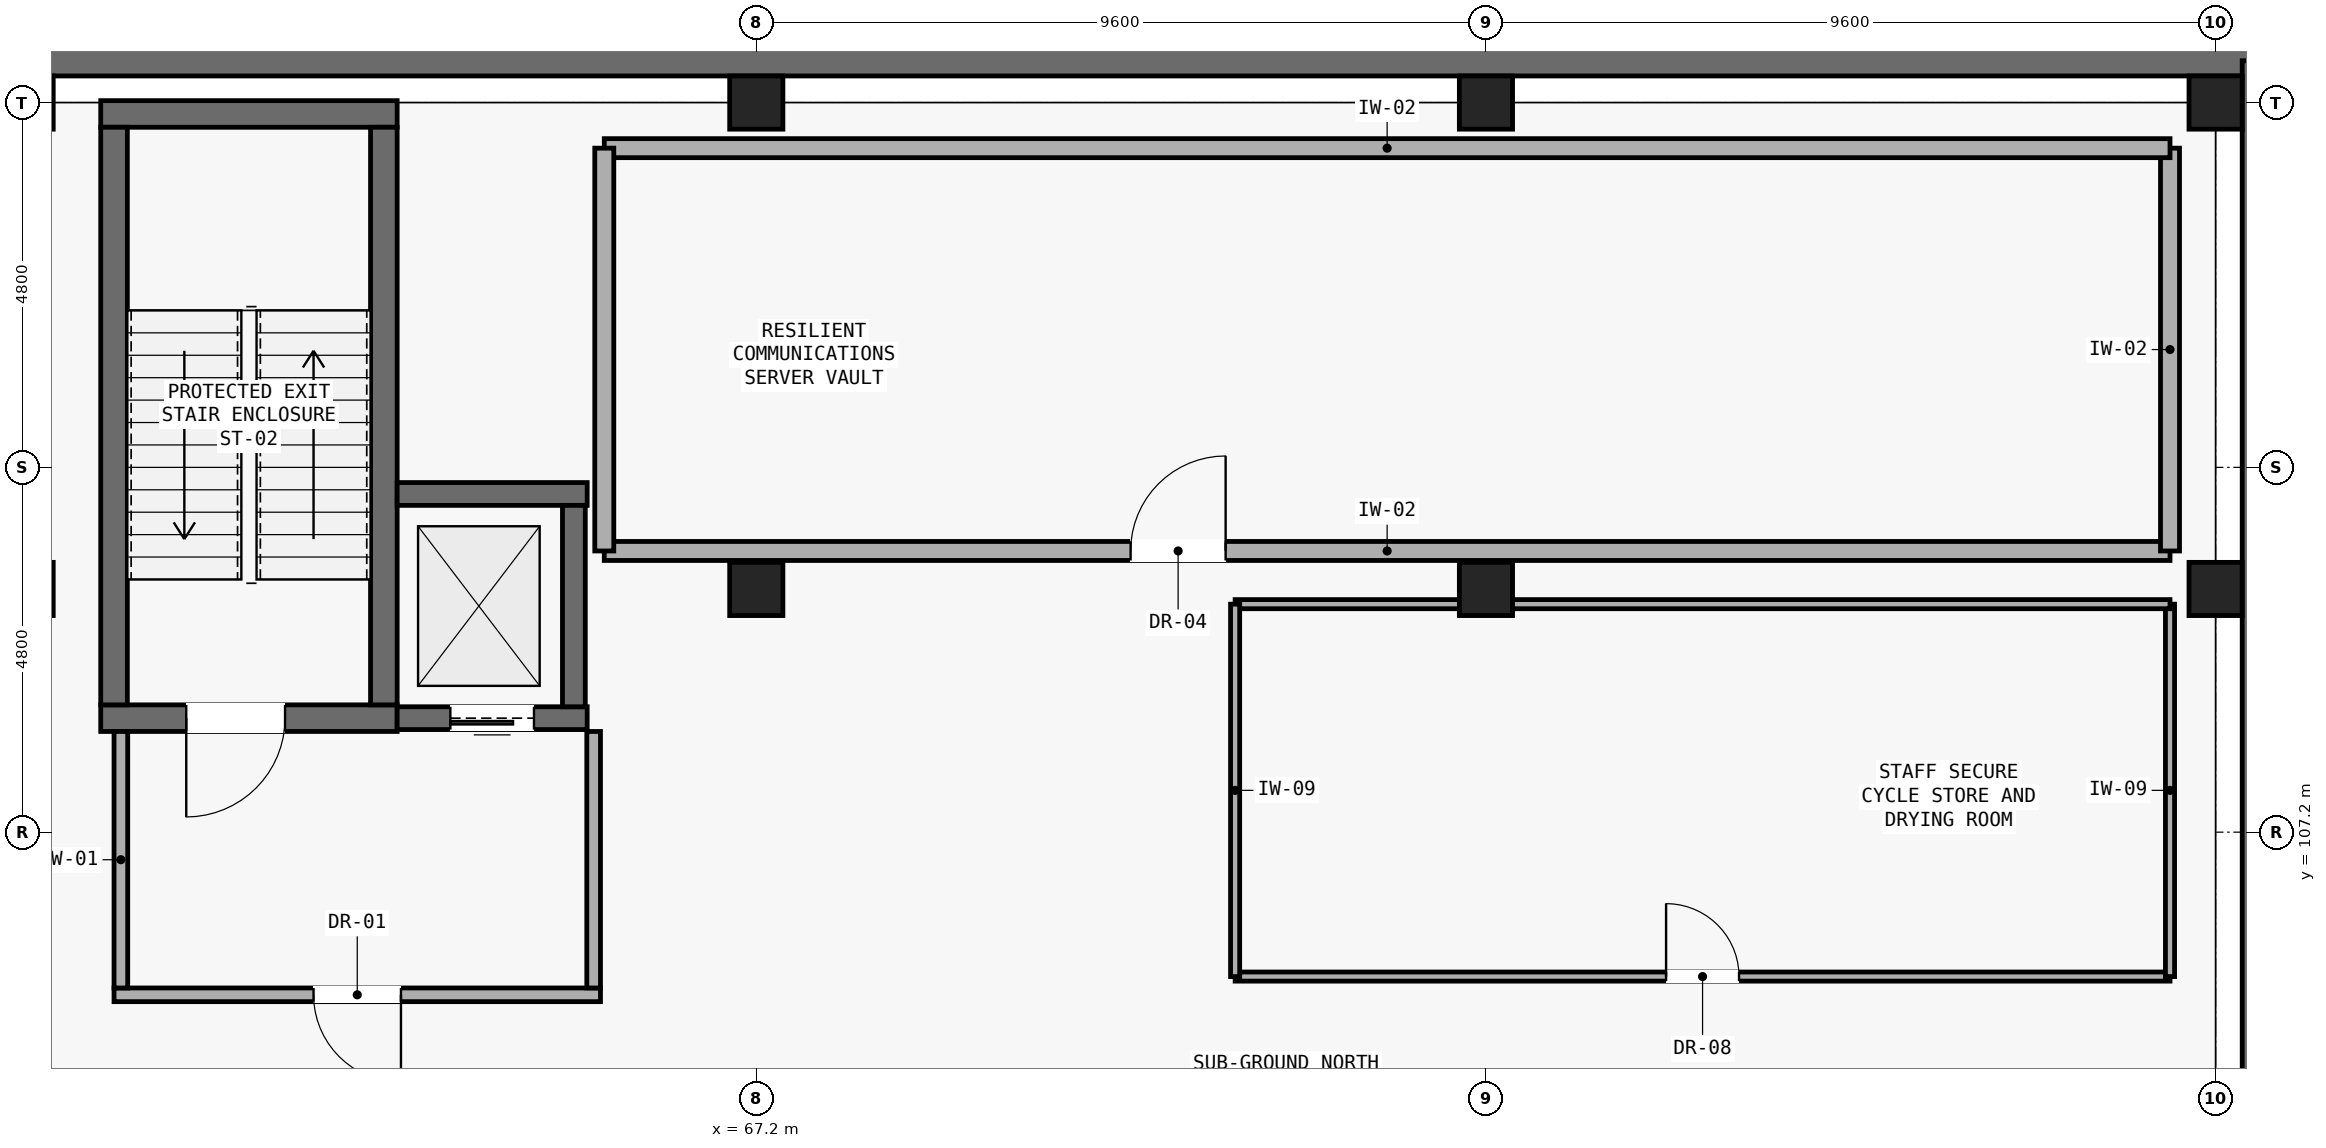
"""IFC4 building model, lengths in metres.
Left out: names, types, materials, properties, quantities, classifications, styles, units other than length and angle.
Written with IfcOpenShell. Run it as: python <this file> out.ifc"""

import sys

from ifc_helpers import new_model, si_unit, direction, frame, frame_2d, origin, origin_2d, place, context, subcontext, project, spatial, rectangle, extrude, element, fill, save


model = new_model("IFC4")
c1 = context("Model", 3, precision=1e-05, world=origin(), true_north=direction((0.0, 1.0)))
c2 = subcontext(c1, "Body", "Model", "MODEL_VIEW")
j1 = project(units=[si_unit("LENGTHUNIT", "METRE"), si_unit("PLANEANGLEUNIT", "RADIAN")], contexts=[c1])
p1 = place(None, origin())
s1 = spatial("IfcSite", under=j1, at=p1, CompositionType="ELEMENT")
p2 = place(p1, origin())
s2 = spatial("IfcBuilding", under=s1, at=p2, CompositionType="ELEMENT")
p3 = place(p2, frame((0.0, 0.0, -4.55)))
s3 = spatial("IfcBuildingStorey", under=s2, at=p3, CompositionType="ELEMENT", Elevation=-4.55)
for number, where, z_axis, x_axis in (
    (1, (57.6, 110.4, 0.0), (0.0, 0.0, 1.0), (1.0, 0.0, 0.0)),
    (2, (57.6, 116.8, 0.0), (0.0, 0.0, 1.0), (1.0, 0.0, 0.0)),
    (3, (67.2, 110.4, 0.0), (0.0, 0.0, 1.0), (1.0, 0.0, 0.0)),
    (4, (67.2, 116.8, 0.0), (0.0, 0.0, 1.0), (1.0, 0.0, 0.0)),
    (5, (76.8, 110.4, 0.0), (0.0, 0.0, 1.0), (1.0, 0.0, 0.0)),
    (6, (76.8, 116.8, 0.0), (0.0, 0.0, 1.0), (1.0, 0.0, 0.0)),
    (7, (86.4, 110.4, 0.0), (0.0, 0.0, 1.0), (1.0, 0.0, 0.0)),
    (8, (86.4, 116.8, 0.0), (0.0, 0.0, 1.0), (1.0, 0.0, 0.0)),
):
    element("IfcColumn", number, at=place(p3, frame(where, z_axis=z_axis, x_axis=x_axis)), inside=s3, PredefinedType="COLUMN", context=c2, shape_type="SweptSolid", body=[
        extrude(rectangle(XDim=0.7, YDim=0.7, at=origin_2d()), origin(), (0.0, 0.0, 1.0), 4.55),
    ])
p4 = place(p3, frame((-0.55, 117.35, 0.0), z_axis=(0.0, 0.0, 1.0), x_axis=(1.0, 0.0, 0.0)))
e9 = element("IfcWall", 9, at=p4, inside=s3, PredefinedType="USERDEFINED", context=c2, shape_type="SweptSolid", body=[
    extrude(rectangle(XDim=87.5, YDim=0.4, at=frame_2d((43.75, 0.0))), origin(), (0.0, 0.0, 1.0), 4.28),
])
p5 = place(p3, frame((86.95, 98.15, 0.0), z_axis=(0.0, 0.0, 1.0), x_axis=(0.0, 1.0, 0.0)))
e10 = element("IfcWall", 10, at=p5, inside=s3, PredefinedType="USERDEFINED", context=c2, shape_type="SweptSolid", body=[
    extrude(rectangle(XDim=19.2, YDim=0.4, at=frame_2d((9.6, 0.0))), origin(), (0.0, 0.0, 1.0), 4.28),
])
p6 = place(p3, frame((58.575, 108.7, 0.0), z_axis=(0.0, 0.0, 1.0), x_axis=(1.0, 0.0, 0.0)))
e11 = element("IfcWall", 11, at=p6, inside=s3, PredefinedType="SHEAR", context=c2, shape_type="SweptSolid", body=[
    extrude(rectangle(XDim=3.9, YDim=0.35, at=frame_2d((1.95, 0.0))), origin(), (0.0, 0.0, 1.0), 4.28),
])
p7 = place(p6, frame((1.125, 0.0, 0.0)))
e12 = element("IfcOpeningElement", 12, at=p7, cuts=e11, PredefinedType="OPENING", context=c2, shape_type="SweptSolid", body=[
    extrude(rectangle(XDim=1.3, YDim=2.15, at=frame_2d((0.65, 1.075))), frame((0.0, 0.185, 0.0), z_axis=(0.0, -1.0, 0.0), x_axis=(1.0, 0.0, 0.0)), (0.0, 0.0, 1.0), 0.37),
])
p8 = place(p3, frame((58.575, 116.65, 0.0), z_axis=(0.0, 0.0, 1.0), x_axis=(1.0, 0.0, 0.0)))
e13 = element("IfcWall", 13, at=p8, inside=s3, PredefinedType="SHEAR", context=c2, shape_type="SweptSolid", body=[
    extrude(rectangle(XDim=3.9, YDim=0.35, at=frame_2d((1.95, 0.0))), origin(), (0.0, 0.0, 1.0), 4.28),
])
for number, where, z_axis, x_axis in (
    (14, (58.75, 108.875, 0.0), (0.0, 0.0, 1.0), (0.0, 1.0, 0.0)),
    (15, (62.3, 108.875, 0.0), (0.0, 0.0, 1.0), (0.0, 1.0, 0.0)),
):
    element("IfcWall", number, at=place(p3, frame(where, z_axis=z_axis, x_axis=x_axis)), inside=s3, PredefinedType="SHEAR", context=c2, shape_type="SweptSolid", body=[
        extrude(rectangle(XDim=7.6, YDim=0.35, at=frame_2d((3.8, 0.0))), origin(), (0.0, 0.0, 1.0), 4.28),
    ])
p9 = place(p3, frame((62.475, 108.7, 0.0), z_axis=(0.0, 0.0, 1.0), x_axis=(1.0, 0.0, 0.0)))
e16 = element("IfcWall", 16, at=p9, inside=s3, PredefinedType="SHEAR", context=c2, shape_type="SweptSolid", body=[
    extrude(rectangle(XDim=2.5, YDim=0.3, at=frame_2d((1.25, 0.0))), origin(), (0.0, 0.0, 1.0), 4.28),
])
p10 = place(p9, frame((0.7, 0.0, 0.0)))
e17 = element("IfcOpeningElement", 17, at=p10, cuts=e16, PredefinedType="OPENING", context=c2, shape_type="SweptSolid", body=[
    extrude(rectangle(XDim=1.1, YDim=2.1, at=frame_2d((0.55, 1.05))), frame((0.0, 0.16, 0.0), z_axis=(0.0, -1.0, 0.0), x_axis=(1.0, 0.0, 0.0)), (0.0, 0.0, 1.0), 0.32),
])
p11 = place(p3, frame((62.475, 111.65, 0.0), z_axis=(0.0, 0.0, 1.0), x_axis=(1.0, 0.0, 0.0)))
e18 = element("IfcWall", 18, at=p11, inside=s3, PredefinedType="SHEAR", context=c2, shape_type="SweptSolid", body=[
    extrude(rectangle(XDim=2.5, YDim=0.3, at=frame_2d((1.25, 0.0))), origin(), (0.0, 0.0, 1.0), 4.28),
])
p12 = place(p3, frame((64.8, 108.85, 0.0), z_axis=(0.0, 0.0, 1.0), x_axis=(0.0, 1.0, 0.0)))
e19 = element("IfcWall", 19, at=p12, inside=s3, PredefinedType="SHEAR", context=c2, shape_type="SweptSolid", body=[
    extrude(rectangle(XDim=2.65, YDim=0.3, at=frame_2d((1.325, 0.0))), origin(), (0.0, 0.0, 1.0), 4.28),
])
p13 = place(p3, frame((58.75, 105.06, 0.0), z_axis=(0.0, 0.0, 1.0), x_axis=(1.0, 0.0, 0.0)))
e20 = element("IfcWall", 20, at=p13, inside=s3, PredefinedType="PARTITIONING", context=c2, shape_type="SweptSolid", body=[
    extrude(rectangle(XDim=6.4, YDim=0.18, at=frame_2d((3.2, 0.0))), origin(), (0.0, 0.0, 1.0), 3.9),
])
p14 = place(p13, frame((2.625, 0.0, 0.0)))
e21 = element("IfcOpeningElement", 21, at=p14, cuts=e20, PredefinedType="OPENING", context=c2, shape_type="SweptSolid", body=[
    extrude(rectangle(XDim=1.15, YDim=2.15, at=frame_2d((0.575, 1.075))), frame((0.0, 0.1, 0.0), z_axis=(0.0, -1.0, 0.0), x_axis=(1.0, 0.0, 0.0)), (0.0, 0.0, 1.0), 0.2),
])
for number, where, z_axis, x_axis in (
    (22, (58.84, 105.15, 0.0), (0.0, 0.0, 1.0), (0.0, 1.0, 0.0)),
    (23, (65.06, 105.15, 0.0), (0.0, 0.0, 1.0), (0.0, 1.0, 0.0)),
):
    element("IfcWall", number, at=place(p3, frame(where, z_axis=z_axis, x_axis=x_axis)), inside=s3, PredefinedType="PARTITIONING", context=c2, shape_type="SweptSolid", body=[
        extrude(rectangle(XDim=3.375, YDim=0.18, at=frame_2d((1.688, 0.0))), origin(), (0.0, 0.0, 1.0), 4.28),
    ])
p15 = place(p3, frame((65.2, 110.9, 0.0), z_axis=(0.0, 0.0, 1.0), x_axis=(1.0, 0.0, 0.0)))
e24 = element("IfcWall", 24, at=p15, inside=s3, PredefinedType="SOLIDWALL", context=c2, shape_type="SweptSolid", body=[
    extrude(rectangle(XDim=20.6, YDim=0.25, at=frame_2d((10.3, 0.0))), origin(), (0.0, 0.0, 1.0), 4.28),
])
p16 = place(p15, frame((6.925, 0.0, 0.0)))
e25 = element("IfcOpeningElement", 25, at=p16, cuts=e24, PredefinedType="OPENING", context=c2, shape_type="SweptSolid", body=[
    extrude(rectangle(XDim=1.25, YDim=2.15, at=frame_2d((0.625, 1.075))), frame((0.0, 0.135, 0.0), z_axis=(0.0, -1.0, 0.0), x_axis=(1.0, 0.0, 0.0)), (0.0, 0.0, 1.0), 0.27),
])
p17 = place(p3, frame((85.8, 110.9, 0.0), z_axis=(0.0, 0.0, 1.0), x_axis=(0.0, 1.0, 0.0)))
e26 = element("IfcWall", 26, at=p17, inside=s3, PredefinedType="SOLIDWALL", context=c2, shape_type="SweptSolid", body=[
    extrude(rectangle(XDim=5.3, YDim=0.25, at=frame_2d((2.65, 0.0))), origin(), (0.0, 0.0, 1.0), 4.28),
])
p18 = place(p3, frame((85.8, 116.2, 0.0), z_axis=(0.0, 0.0, 1.0), x_axis=(-1.0, 0.0, 0.0)))
e27 = element("IfcWall", 27, at=p18, inside=s3, PredefinedType="SOLIDWALL", context=c2, shape_type="SweptSolid", body=[
    extrude(rectangle(XDim=20.6, YDim=0.25, at=frame_2d((10.3, 0.0))), origin(), (0.0, 0.0, 1.0), 4.28),
])
p19 = place(p3, frame((65.2, 116.2, 0.0), z_axis=(0.0, 0.0, 1.0), x_axis=(0.0, -1.0, 0.0)))
e28 = element("IfcWall", 28, at=p19, inside=s3, PredefinedType="SOLIDWALL", context=c2, shape_type="SweptSolid", body=[
    extrude(rectangle(XDim=5.3, YDim=0.25, at=frame_2d((2.65, 0.0))), origin(), (0.0, 0.0, 1.0), 4.28),
])
p20 = place(p3, frame((73.5, 105.3, 0.0), z_axis=(0.0, 0.0, 1.0), x_axis=(1.0, 0.0, 0.0)))
e29 = element("IfcWall", 29, at=p20, inside=s3, PredefinedType="PARTITIONING", context=c2, shape_type="SweptSolid", body=[
    extrude(rectangle(XDim=12.3, YDim=0.12, at=frame_2d((6.15, 0.0))), origin(), (0.0, 0.0, 1.0), 3.9),
])
p21 = place(p20, frame((5.67, 0.0, 0.0)))
e30 = element("IfcOpeningElement", 30, at=p21, cuts=e29, PredefinedType="OPENING", context=c2, shape_type="SweptSolid", body=[
    extrude(rectangle(XDim=0.96, YDim=2.08, at=frame_2d((0.48, 1.04))), frame((0.0, 0.07, 0.0), z_axis=(0.0, -1.0, 0.0), x_axis=(1.0, 0.0, 0.0)), (0.0, 0.0, 1.0), 0.14),
])
p22 = place(p3, frame((85.8, 105.3, 0.0), z_axis=(0.0, 0.0, 1.0), x_axis=(0.0, 1.0, 0.0)))
e31 = element("IfcWall", 31, at=p22, inside=s3, PredefinedType="PARTITIONING", context=c2, shape_type="SweptSolid", body=[
    extrude(rectangle(XDim=4.9, YDim=0.12, at=frame_2d((2.45, 0.0))), origin(), (0.0, 0.0, 1.0), 4.28),
])
p23 = place(p3, frame((85.8, 110.2, 0.0), z_axis=(0.0, 0.0, 1.0), x_axis=(-1.0, 0.0, 0.0)))
e32 = element("IfcWall", 32, at=p23, inside=s3, PredefinedType="PARTITIONING", context=c2, shape_type="SweptSolid", body=[
    extrude(rectangle(XDim=12.3, YDim=0.12, at=frame_2d((6.15, 0.0))), origin(), (0.0, 0.0, 1.0), 3.72),
])
p24 = place(p3, frame((73.5, 110.2, 0.0), z_axis=(0.0, 0.0, 1.0), x_axis=(0.0, -1.0, 0.0)))
e33 = element("IfcWall", 33, at=p24, inside=s3, PredefinedType="PARTITIONING", context=c2, shape_type="SweptSolid", body=[
    extrude(rectangle(XDim=4.9, YDim=0.12, at=frame_2d((2.45, 0.0))), origin(), (0.0, 0.0, 1.0), 4.28),
])
p25 = place(p7, frame((1.3, 0.0, 0.0), z_axis=(0.0, 0.0, 1.0), x_axis=(-1.0, 0.0, 0.0)))
e34 = element("IfcDoor", 34, at=p25, inside=s3, OperationType="SINGLE_SWING_LEFT", PredefinedType="DOOR", context=c2, shape_type="SweptSolid", body=[
    extrude(rectangle(XDim=1.3, YDim=2.15, at=frame_2d((0.65, 1.075))), frame((0.0, 0.025, 0.0), z_axis=(0.0, -1.0, 0.0), x_axis=(1.0, 0.0, 0.0)), (0.0, 0.0, 1.0), 0.05),
])
fill(e12, e34)
p26 = place(p10, frame((1.1, 0.0, 0.0), z_axis=(0.0, 0.0, 1.0), x_axis=(-1.0, 0.0, 0.0)))
e35 = element("IfcDoor", 35, at=p26, inside=s3, OperationType="SLIDING_TO_LEFT", PredefinedType="DOOR", context=c2, shape_type="SweptSolid", body=[
    extrude(rectangle(XDim=1.1, YDim=2.1, at=frame_2d((0.55, 1.05))), frame((0.0, 0.025, 0.0), z_axis=(0.0, -1.0, 0.0), x_axis=(1.0, 0.0, 0.0)), (0.0, 0.0, 1.0), 0.05),
])
fill(e17, e35)
p27 = place(p14, frame((1.15, 0.0, 0.0), z_axis=(0.0, 0.0, 1.0), x_axis=(-1.0, 0.0, 0.0)))
e36 = element("IfcDoor", 36, at=p27, inside=s3, OperationType="SINGLE_SWING_RIGHT", PredefinedType="DOOR", context=c2, shape_type="SweptSolid", body=[
    extrude(rectangle(XDim=1.15, YDim=2.15, at=frame_2d((0.575, 1.075))), frame((0.0, 0.025, 0.0), z_axis=(0.0, -1.0, 0.0), x_axis=(1.0, 0.0, 0.0)), (0.0, 0.0, 1.0), 0.05),
])
fill(e21, e36)
p28 = place(p16, origin())
e37 = element("IfcDoor", 37, at=p28, inside=s3, OperationType="SINGLE_SWING_RIGHT", PredefinedType="DOOR", context=c2, shape_type="SweptSolid", body=[
    extrude(rectangle(XDim=1.25, YDim=2.15, at=frame_2d((0.625, 1.075))), frame((0.0, 0.025, 0.0), z_axis=(0.0, -1.0, 0.0), x_axis=(1.0, 0.0, 0.0)), (0.0, 0.0, 1.0), 0.05),
])
fill(e25, e37)
p29 = place(p21, origin())
e38 = element("IfcDoor", 38, at=p29, inside=s3, OperationType="SINGLE_SWING_LEFT", PredefinedType="DOOR", context=c2, shape_type="SweptSolid", body=[
    extrude(rectangle(XDim=0.96, YDim=2.08, at=frame_2d((0.48, 1.04))), frame((0.0, 0.025, 0.0), z_axis=(0.0, -1.0, 0.0), x_axis=(1.0, 0.0, 0.0)), (0.0, 0.0, 1.0), 0.05),
])
fill(e30, e38)
save(model, sys.argv[1])
